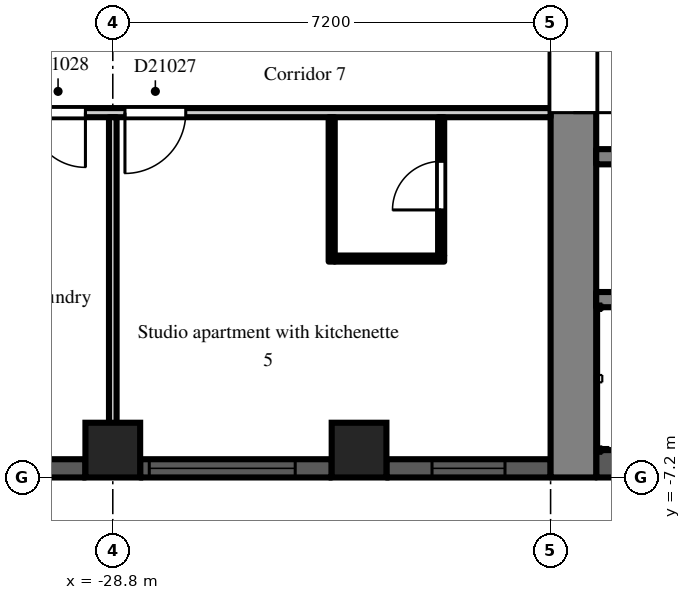
"""IFC4 building model, lengths in metres.
Left out: names, types, materials, properties, quantities, classifications, styles, units other than length and angle.
Written with IfcOpenShell. Run it as: python <this file> out.ifc"""

import sys

from ifc_helpers import new_model, si_unit, direction, frame, frame_2d, origin, origin_2d, place, context, subcontext, project, spatial, rectangle, extrude, element, fill, save


model = new_model("IFC4")
c1 = context("Model", 3, precision=1e-05, world=origin(), true_north=direction((0.0, 1.0)))
c2 = subcontext(c1, "Body", "Model", "MODEL_VIEW")
j1 = project(units=[si_unit("LENGTHUNIT", "METRE"), si_unit("PLANEANGLEUNIT", "RADIAN")], contexts=[c1])
p1 = place(None, origin())
s1 = spatial("IfcSite", under=j1, at=p1, CompositionType="ELEMENT")
p2 = place(p1, origin())
s2 = spatial("IfcBuilding", under=s1, at=p2, CompositionType="ELEMENT")
p3 = place(p2, frame((0.0, 0.0, 147.3)))
s3 = spatial("IfcBuildingStorey", under=s2, at=p3, CompositionType="ELEMENT", Elevation=147.3)
for number, where, z_axis, x_axis in (
    (1, (-28.8, -6.75, 0.0), (0.0, 0.0, 1.0), (1.0, 0.0, 0.0)),
    (2, (-24.75, -6.75, 0.0), (0.0, 0.0, 1.0), (1.0, 0.0, 0.0)),
):
    element("IfcColumn", number, at=place(p3, frame(where, z_axis=z_axis, x_axis=x_axis)), inside=s3, PredefinedType="COLUMN", context=c2, shape_type="SweptSolid", body=[
        extrude(rectangle(XDim=0.9, YDim=0.9, at=origin_2d()), origin(), (0.0, 0.0, 1.0), 3.0),
    ])
p4 = place(p3, frame((-35.55, -7.05, 0.0), z_axis=(0.0, 0.0, 1.0), x_axis=(1.0, 0.0, 0.0)))
e3 = element("IfcWall", 3, at=p4, inside=s3, PredefinedType="SOLIDWALL", context=c2, shape_type="SweptSolid", body=[
    extrude(rectangle(XDim=6.3, YDim=0.3, at=frame_2d((3.15, 0.0))), origin(), (0.0, 0.0, 1.0), 2.2),
])
p5 = place(p4, frame((0.15, 0.0, 0.2)))
e4 = element("IfcOpeningElement", 4, at=p5, cuts=e3, PredefinedType="OPENING", context=c2, shape_type="SweptSolid", body=[
    extrude(rectangle(XDim=2.4, YDim=1.85, at=frame_2d((1.2, 0.925))), frame((0.0, 0.16, 0.0), z_axis=(0.0, -1.0, 0.0), x_axis=(1.0, 0.0, 0.0)), (0.0, 0.0, 1.0), 0.32),
])
p6 = place(p3, frame((-28.35, -7.05, 0.0), z_axis=(0.0, 0.0, 1.0), x_axis=(1.0, 0.0, 0.0)))
e5 = element("IfcWall", 5, at=p6, inside=s3, PredefinedType="SOLIDWALL", context=c2, shape_type="SweptSolid", body=[
    extrude(rectangle(XDim=3.15, YDim=0.3, at=frame_2d((1.575, 0.0))), origin(), (0.0, 0.0, 1.0), 2.2),
])
p7 = place(p6, frame((0.15, 0.0, 0.2)))
e6 = element("IfcOpeningElement", 6, at=p7, cuts=e5, PredefinedType="OPENING", context=c2, shape_type="SweptSolid", body=[
    extrude(rectangle(XDim=2.4, YDim=1.85, at=frame_2d((1.2, 0.925))), frame((0.0, 0.16, 0.0), z_axis=(0.0, -1.0, 0.0), x_axis=(1.0, 0.0, 0.0)), (0.0, 0.0, 1.0), 0.32),
])
p8 = place(p3, frame((-24.3, -7.05, 0.0), z_axis=(0.0, 0.0, 1.0), x_axis=(1.0, 0.0, 0.0)))
e7 = element("IfcWall", 7, at=p8, inside=s3, PredefinedType="SOLIDWALL", context=c2, shape_type="SweptSolid", body=[
    extrude(rectangle(XDim=2.7, YDim=0.3, at=frame_2d((1.35, 0.0))), origin(), (0.0, 0.0, 1.0), 2.2),
])
p9 = place(p8, frame((0.75, 0.0, 0.2)))
e8 = element("IfcOpeningElement", 8, at=p9, cuts=e7, PredefinedType="OPENING", context=c2, shape_type="SweptSolid", body=[
    extrude(rectangle(XDim=1.2, YDim=1.85, at=frame_2d((0.6, 0.925))), frame((0.0, 0.16, 0.0), z_axis=(0.0, -1.0, 0.0), x_axis=(1.0, 0.0, 0.0)), (0.0, 0.0, 1.0), 0.32),
])
p10 = place(p3, frame((-21.225, -7.2, 0.0), z_axis=(0.0, 0.0, 1.0), x_axis=(0.0, 1.0, 0.0)))
e9 = element("IfcWall", 9, at=p10, inside=s3, PredefinedType="SHEAR", context=c2, shape_type="SweptSolid", body=[
    extrude(rectangle(XDim=14.4, YDim=0.75, at=frame_2d((7.2, 0.0))), origin(), (0.0, 0.0, 1.0), 2.6),
])
p11 = place(p10, frame((6.0, 0.0, 0.0)))
e10 = element("IfcOpeningElement", 10, at=p11, cuts=e9, PredefinedType="OPENING", context=c2, shape_type="SweptSolid", body=[
    extrude(rectangle(XDim=2.4, YDim=2.2, at=frame_2d((1.2, 1.1))), frame((0.0, 0.385, 0.0), z_axis=(0.0, -1.0, 0.0), x_axis=(1.0, 0.0, 0.0)), (0.0, 0.0, 1.0), 0.77),
])
p12 = place(p3, frame((-7.9, -6.975, 0.0), z_axis=(0.0, 0.0, 1.0), x_axis=(-1.0, 0.0, 0.0)))
e11 = element("IfcWall", 11, at=p12, inside=s3, PredefinedType="SHEAR", context=c2, shape_type="SweptSolid", body=[
    extrude(rectangle(XDim=12.95, YDim=0.45, at=frame_2d((6.475, 0.0))), origin(), (0.0, 0.0, 1.0), 2.6),
])
p13 = place(p3, frame((-7.9, -1.925, 0.0), z_axis=(0.0, 0.0, 1.0), x_axis=(-1.0, 0.0, 0.0)))
e12 = element("IfcWall", 12, at=p13, inside=s3, PredefinedType="SHEAR", context=c2, shape_type="SweptSolid", body=[
    extrude(rectangle(XDim=12.95, YDim=0.25, at=frame_2d((6.475, 0.0))), origin(), (0.0, 0.0, 1.0), 2.6),
])
p14 = place(p13, frame((0.525, 0.0, 0.0)))
e13 = element("IfcOpeningElement", 13, at=p14, cuts=e12, PredefinedType="OPENING", context=c2, shape_type="SweptSolid", body=[
    extrude(rectangle(XDim=0.9, YDim=2.1, at=frame_2d((0.45, 1.05))), frame((0.0, 0.135, 0.0), z_axis=(0.0, -1.0, 0.0), x_axis=(1.0, 0.0, 0.0)), (0.0, 0.0, 1.0), 0.27),
])
p15 = place(p13, frame((2.625, 0.0, 0.0)))
e14 = element("IfcOpeningElement", 14, at=p15, cuts=e12, PredefinedType="OPENING", context=c2, shape_type="SweptSolid", body=[
    extrude(rectangle(XDim=1.1, YDim=2.1, at=frame_2d((0.55, 1.05))), frame((0.0, 0.135, 0.0), z_axis=(0.0, -1.0, 0.0), x_axis=(1.0, 0.0, 0.0)), (0.0, 0.0, 1.0), 0.27),
])
p16 = place(p13, frame((4.925, 0.0, 0.0)))
e15 = element("IfcOpeningElement", 15, at=p16, cuts=e12, PredefinedType="OPENING", context=c2, shape_type="SweptSolid", body=[
    extrude(rectangle(XDim=0.9, YDim=2.1, at=frame_2d((0.45, 1.05))), frame((0.0, 0.135, 0.0), z_axis=(0.0, -1.0, 0.0), x_axis=(1.0, 0.0, 0.0)), (0.0, 0.0, 1.0), 0.27),
])
p17 = place(p13, frame((8.225, 0.0, 0.0)))
e16 = element("IfcOpeningElement", 16, at=p17, cuts=e12, PredefinedType="OPENING", context=c2, shape_type="SweptSolid", body=[
    extrude(rectangle(XDim=0.9, YDim=2.1, at=frame_2d((0.45, 1.05))), frame((0.0, 0.135, 0.0), z_axis=(0.0, -1.0, 0.0), x_axis=(1.0, 0.0, 0.0)), (0.0, 0.0, 1.0), 0.27),
])
p18 = place(p13, frame((11.525, 0.0, 0.0)))
e17 = element("IfcOpeningElement", 17, at=p18, cuts=e12, PredefinedType="OPENING", context=c2, shape_type="SweptSolid", body=[
    extrude(rectangle(XDim=0.9, YDim=2.1, at=frame_2d((0.45, 1.05))), frame((0.0, 0.135, 0.0), z_axis=(0.0, -1.0, 0.0), x_axis=(1.0, 0.0, 0.0)), (0.0, 0.0, 1.0), 0.27),
])
p19 = place(p3, frame((-12.3, -4.275, 0.0), z_axis=(0.0, 0.0, 1.0), x_axis=(-1.0, 0.0, 0.0)))
e18 = element("IfcWall", 18, at=p19, inside=s3, PredefinedType="SHEAR", context=c2, shape_type="SweptSolid", body=[
    extrude(rectangle(XDim=8.55, YDim=0.25, at=frame_2d((4.275, 0.0))), origin(), (0.0, 0.0, 1.0), 2.6),
])
p20 = place(p3, frame((-36.5, -1.2, 0.0), z_axis=(0.0, 0.0, 1.0), x_axis=(1.0, 0.0, 0.0)))
e19 = element("IfcWall", 19, at=p20, inside=s3, PredefinedType="PARTITIONING", context=c2, shape_type="SweptSolid", body=[
    extrude(rectangle(XDim=14.9, YDim=0.15, at=frame_2d((7.45, 0.0))), origin(), (0.0, 0.0, 1.0), 2.6),
])
p21 = place(p20, frame((7.9, 0.0, 0.0)))
e20 = element("IfcOpeningElement", 20, at=p21, cuts=e19, PredefinedType="OPENING", context=c2, shape_type="SweptSolid", body=[
    extrude(rectangle(XDim=1.0, YDim=2.1, at=frame_2d((0.5, 1.05))), frame((0.0, 0.085, 0.0), z_axis=(0.0, -1.0, 0.0), x_axis=(1.0, 0.0, 0.0)), (0.0, 0.0, 1.0), 0.17),
])
p22 = place(p20, frame((6.35, 0.0, 0.0)))
e21 = element("IfcOpeningElement", 21, at=p22, cuts=e19, PredefinedType="OPENING", context=c2, shape_type="SweptSolid", body=[
    extrude(rectangle(XDim=0.9, YDim=2.1, at=frame_2d((0.45, 1.05))), frame((0.0, 0.085, 0.0), z_axis=(0.0, -1.0, 0.0), x_axis=(1.0, 0.0, 0.0)), (0.0, 0.0, 1.0), 0.17),
])
p23 = place(p20, frame((4.55, 0.0, 0.0)))
e22 = element("IfcOpeningElement", 22, at=p23, cuts=e19, PredefinedType="OPENING", context=c2, shape_type="SweptSolid", body=[
    extrude(rectangle(XDim=0.9, YDim=2.1, at=frame_2d((0.45, 1.05))), frame((0.0, 0.085, 0.0), z_axis=(0.0, -1.0, 0.0), x_axis=(1.0, 0.0, 0.0)), (0.0, 0.0, 1.0), 0.17),
])
p24 = place(p20, frame((1.15, 0.0, 0.0)))
e23 = element("IfcOpeningElement", 23, at=p24, cuts=e19, PredefinedType="OPENING", context=c2, shape_type="SweptSolid", body=[
    extrude(rectangle(XDim=1.8, YDim=2.1, at=frame_2d((0.9, 1.05))), frame((0.0, 0.085, 0.0), z_axis=(0.0, -1.0, 0.0), x_axis=(1.0, 0.0, 0.0)), (0.0, 0.0, 1.0), 0.17),
])
p25 = place(p3, frame((-28.8, -6.9, 0.0), z_axis=(0.0, 0.0, 1.0), x_axis=(0.0, 1.0, 0.0)))
e24 = element("IfcWall", 24, at=p25, inside=s3, PredefinedType="PARTITIONING", context=c2, shape_type="SweptSolid", body=[
    extrude(rectangle(XDim=5.625, YDim=0.125, at=frame_2d((2.812, 0.0))), origin(), (0.0, 0.0, 1.0), 2.6),
])
p26 = place(p3, frame((-25.2, -3.65, 0.0), z_axis=(0.0, 0.0, 1.0), x_axis=(0.0, 1.0, 0.0)))
e25 = element("IfcWall", 25, at=p26, inside=s3, PredefinedType="PARTITIONING", context=c2, shape_type="SweptSolid", body=[
    extrude(rectangle(XDim=2.375, YDim=0.1, at=frame_2d((1.188, 0.0))), origin(), (0.0, 0.0, 1.0), 2.6),
])
p27 = place(p3, frame((-25.15, -3.6, 0.0), z_axis=(0.0, 0.0, 1.0), x_axis=(1.0, 0.0, 0.0)))
e26 = element("IfcWall", 26, at=p27, inside=s3, PredefinedType="PARTITIONING", context=c2, shape_type="SweptSolid", body=[
    extrude(rectangle(XDim=1.8, YDim=0.1, at=frame_2d((0.9, 0.0))), origin(), (0.0, 0.0, 1.0), 2.6),
])
p28 = place(p3, frame((-23.4, -3.55, 0.0), z_axis=(0.0, 0.0, 1.0), x_axis=(0.0, 1.0, 0.0)))
e27 = element("IfcWall", 27, at=p28, inside=s3, PredefinedType="PARTITIONING", context=c2, shape_type="SweptSolid", body=[
    extrude(rectangle(XDim=2.275, YDim=0.1, at=frame_2d((1.138, 0.0))), origin(), (0.0, 0.0, 1.0), 2.6),
])
p29 = place(p28, frame((0.75, 0.0, 0.0)))
e28 = element("IfcOpeningElement", 28, at=p29, cuts=e27, PredefinedType="OPENING", context=c2, shape_type="SweptSolid", body=[
    extrude(rectangle(XDim=0.8, YDim=2.1, at=frame_2d((0.4, 1.05))), frame((0.0, 0.06, 0.0), z_axis=(0.0, -1.0, 0.0), x_axis=(1.0, 0.0, 0.0)), (0.0, 0.0, 1.0), 0.12),
])
p30 = place(p7, origin())
e29 = element("IfcWindow", 29, at=p30, inside=s3, PartitioningType="SINGLE_PANEL", PredefinedType="WINDOW", context=c2, shape_type="SweptSolid", body=[
    extrude(rectangle(XDim=2.4, YDim=1.85, at=frame_2d((1.2, 0.925))), frame((0.0, 0.03, 0.0), z_axis=(0.0, -1.0, 0.0), x_axis=(1.0, 0.0, 0.0)), (0.0, 0.0, 1.0), 0.06),
])
fill(e6, e29)
p31 = place(p9, origin())
e30 = element("IfcWindow", 30, at=p31, inside=s3, PartitioningType="SINGLE_PANEL", PredefinedType="WINDOW", context=c2, shape_type="SweptSolid", body=[
    extrude(rectangle(XDim=1.2, YDim=1.85, at=frame_2d((0.6, 0.925))), frame((0.0, 0.03, 0.0), z_axis=(0.0, -1.0, 0.0), x_axis=(1.0, 0.0, 0.0)), (0.0, 0.0, 1.0), 0.06),
])
fill(e8, e30)
p32 = place(p11, frame((2.4, 0.0, 0.0), z_axis=(0.0, 0.0, 1.0), x_axis=(-1.0, 0.0, 0.0)))
e31 = element("IfcDoor", 31, at=p32, inside=s3, OperationType="DOUBLE_DOOR_DOUBLE_SWING", PredefinedType="DOOR", context=c2, shape_type="SweptSolid", body=[
    extrude(rectangle(XDim=2.4, YDim=2.2, at=frame_2d((1.2, 1.1))), frame((0.0, 0.025, 0.0), z_axis=(0.0, -1.0, 0.0), x_axis=(1.0, 0.0, 0.0)), (0.0, 0.0, 1.0), 0.05),
])
fill(e10, e31)
p33 = place(p29, origin())
e32 = element("IfcDoor", 32, at=p33, inside=s3, OperationType="SINGLE_SWING_LEFT", PredefinedType="DOOR", context=c2, shape_type="SweptSolid", body=[
    extrude(rectangle(XDim=0.8, YDim=2.1, at=frame_2d((0.4, 1.05))), frame((0.0, 0.025, 0.0), z_axis=(0.0, -1.0, 0.0), x_axis=(1.0, 0.0, 0.0)), (0.0, 0.0, 1.0), 0.05),
])
fill(e28, e32)
p34 = place(p21, frame((1.0, 0.0, 0.0), z_axis=(0.0, 0.0, 1.0), x_axis=(-1.0, 0.0, 0.0)))
e33 = element("IfcDoor", 33, at=p34, inside=s3, OperationType="SINGLE_SWING_RIGHT", PredefinedType="DOOR", context=c2, shape_type="SweptSolid", body=[
    extrude(rectangle(XDim=1.0, YDim=2.1, at=frame_2d((0.5, 1.05))), frame((0.0, 0.025, 0.0), z_axis=(0.0, -1.0, 0.0), x_axis=(1.0, 0.0, 0.0)), (0.0, 0.0, 1.0), 0.05),
])
fill(e20, e33)
p35 = place(p22, frame((0.9, 0.0, 0.0), z_axis=(0.0, 0.0, 1.0), x_axis=(-1.0, 0.0, 0.0)))
e34 = element("IfcDoor", 34, at=p35, inside=s3, OperationType="SINGLE_SWING_LEFT", PredefinedType="DOOR", context=c2, shape_type="SweptSolid", body=[
    extrude(rectangle(XDim=0.9, YDim=2.1, at=frame_2d((0.45, 1.05))), frame((0.0, 0.025, 0.0), z_axis=(0.0, -1.0, 0.0), x_axis=(1.0, 0.0, 0.0)), (0.0, 0.0, 1.0), 0.05),
])
fill(e21, e34)
save(model, sys.argv[1])
